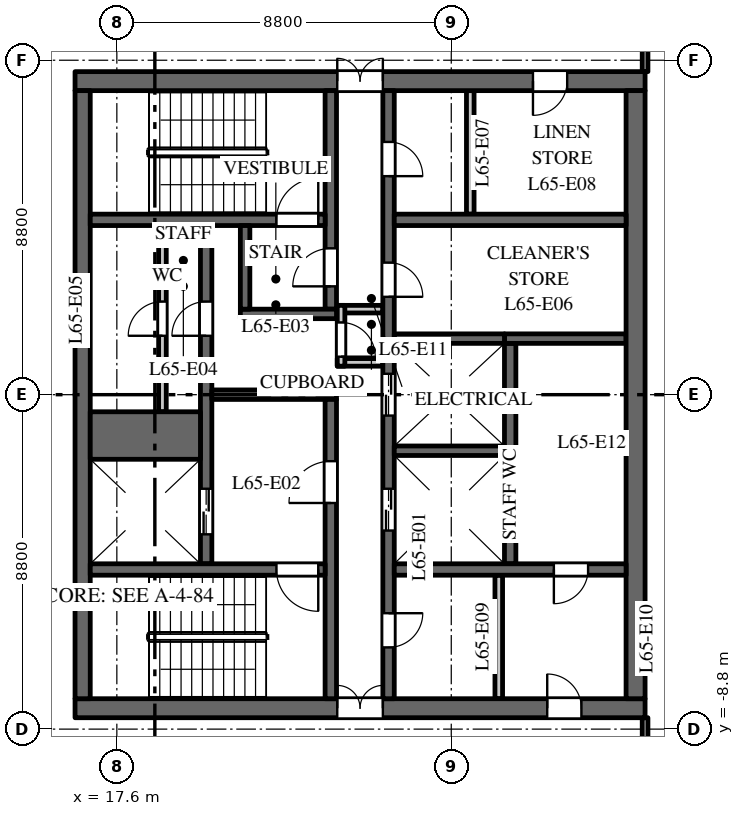
"""IFC4 building model, lengths in metres.
Left out: names, types, materials, properties, quantities, classifications, styles, units other than length and angle.
Written with IfcOpenShell. Run it as: python <this file> out.ifc"""

import sys

from ifc_helpers import new_model, si_unit, direction, frame, frame_2d, origin, place, context, subcontext, project, spatial, rectangle, extrude, element, fill, save


model = new_model("IFC4")
c1 = context("Model", 3, precision=1e-05, world=origin(), true_north=direction((0.0, 1.0)))
c2 = subcontext(c1, "Body", "Model", "MODEL_VIEW")
j1 = project(units=[si_unit("LENGTHUNIT", "METRE"), si_unit("PLANEANGLEUNIT", "RADIAN")], contexts=[c1])
p1 = place(None, origin())
s1 = spatial("IfcSite", under=j1, at=p1, CompositionType="ELEMENT")
p2 = place(p1, origin())
s2 = spatial("IfcBuilding", under=s1, at=p2, CompositionType="ELEMENT")
p3 = place(p2, frame((0.0, 0.0, 303.0)))
s3 = spatial("IfcBuildingStorey", under=s2, at=p3, CompositionType="ELEMENT", Elevation=303.0)
p4 = place(p3, frame((16.5, 8.25, 0.0), z_axis=(0.0, 0.0, 1.0), x_axis=(1.0, 0.0, 0.0)))
e1 = element("IfcWall", 1, at=p4, inside=s3, PredefinedType="SHEAR", context=c2, shape_type="SweptSolid", body=[
    extrude(rectangle(XDim=15.0, YDim=0.5, at=frame_2d((7.5, 0.0))), origin(), (0.0, 0.0, 1.0), 3.7),
])
p5 = place(p4, frame((6.9, 0.0, 0.0)))
e2 = element("IfcOpeningElement", 2, at=p5, cuts=e1, PredefinedType="OPENING", context=c2, shape_type="SweptSolid", body=[
    extrude(rectangle(XDim=1.2, YDim=2.1, at=frame_2d((0.6, 1.05))), frame((0.0, 0.26, 0.0), z_axis=(0.0, -1.0, 0.0), x_axis=(1.0, 0.0, 0.0)), (0.0, 0.0, 1.0), 0.52),
])
p6 = place(p4, frame((12.05, 0.0, 0.0)))
e3 = element("IfcOpeningElement", 3, at=p6, cuts=e1, PredefinedType="OPENING", context=c2, shape_type="SweptSolid", body=[
    extrude(rectangle(XDim=0.9, YDim=2.1, at=frame_2d((0.45, 1.05))), frame((0.0, 0.26, 0.0), z_axis=(0.0, -1.0, 0.0), x_axis=(1.0, 0.0, 0.0)), (0.0, 0.0, 1.0), 0.52),
])
p7 = place(p3, frame((16.5, -8.25, 0.0), z_axis=(0.0, 0.0, 1.0), x_axis=(1.0, 0.0, 0.0)))
e4 = element("IfcWall", 4, at=p7, inside=s3, PredefinedType="SHEAR", context=c2, shape_type="SweptSolid", body=[
    extrude(rectangle(XDim=15.0, YDim=0.5, at=frame_2d((7.5, 0.0))), origin(), (0.0, 0.0, 1.0), 3.7),
])
p8 = place(p7, frame((6.9, 0.0, 0.0)))
e5 = element("IfcOpeningElement", 5, at=p8, cuts=e4, PredefinedType="OPENING", context=c2, shape_type="SweptSolid", body=[
    extrude(rectangle(XDim=1.2, YDim=2.1, at=frame_2d((0.6, 1.05))), frame((0.0, 0.26, 0.0), z_axis=(0.0, -1.0, 0.0), x_axis=(1.0, 0.0, 0.0)), (0.0, 0.0, 1.0), 0.52),
])
p9 = place(p7, frame((12.425, 0.0, 0.0)))
e6 = element("IfcOpeningElement", 6, at=p9, cuts=e4, PredefinedType="OPENING", context=c2, shape_type="SweptSolid", body=[
    extrude(rectangle(XDim=0.9, YDim=2.1, at=frame_2d((0.45, 1.05))), frame((0.0, 0.26, 0.0), z_axis=(0.0, -1.0, 0.0), x_axis=(1.0, 0.0, 0.0)), (0.0, 0.0, 1.0), 0.52),
])
p10 = place(p3, frame((18.8, -0.45, 0.0), z_axis=(0.0, 0.0, 1.0), x_axis=(0.0, 1.0, 0.0)))
e7 = element("IfcWall", 7, at=p10, inside=s3, PredefinedType="PARTITIONING", context=c2, shape_type="SweptSolid", body=[
    extrude(rectangle(XDim=4.9, YDim=0.2, at=frame_2d((2.45, 0.0))), origin(), (0.0, 0.0, 1.0), 3.7),
])
p11 = place(p10, frame((2.0, 0.0, 0.0)))
e8 = element("IfcOpeningElement", 8, at=p11, cuts=e7, PredefinedType="OPENING", context=c2, shape_type="SweptSolid", body=[
    extrude(rectangle(XDim=0.9, YDim=2.1, at=frame_2d((0.45, 1.05))), frame((0.0, 0.11, 0.0), z_axis=(0.0, -1.0, 0.0), x_axis=(1.0, 0.0, 0.0)), (0.0, 0.0, 1.0), 0.22),
])
p12 = place(p3, frame((27.95, -4.45, 0.0), z_axis=(0.0, 0.0, 1.0), x_axis=(0.0, 1.0, 0.0)))
e9 = element("IfcWall", 9, at=p12, inside=s3, PredefinedType="SHEAR", context=c2, shape_type="SweptSolid", body=[
    extrude(rectangle(XDim=5.8, YDim=0.3, at=frame_2d((2.9, 0.0))), origin(), (0.0, 0.0, 1.0), 3.7),
])
p13 = place(p3, frame((27.8, 1.475, 0.0), z_axis=(0.0, 0.0, 1.0), x_axis=(1.0, 0.0, 0.0)))
e10 = element("IfcWall", 10, at=p13, inside=s3, PredefinedType="SHEAR", context=c2, shape_type="SweptSolid", body=[
    extrude(rectangle(XDim=3.2, YDim=0.25, at=frame_2d((1.6, 0.0))), origin(), (0.0, 0.0, 1.0), 3.7),
])
p14 = place(p3, frame((19.95, -4.45, 0.0), z_axis=(0.0, 0.0, 1.0), x_axis=(0.0, 1.0, 0.0)))
e11 = element("IfcWall", 11, at=p14, inside=s3, PredefinedType="SHEAR", context=c2, shape_type="SweptSolid", body=[
    extrude(rectangle(XDim=8.9, YDim=0.3, at=frame_2d((4.45, 0.0))), origin(), (0.0, 0.0, 1.0), 3.7),
])
p15 = place(p14, frame((0.775, 0.0, 0.0)))
e12 = element("IfcOpeningElement", 12, at=p15, cuts=e11, PredefinedType="OPENING", context=c2, shape_type="SweptSolid", body=[
    extrude(rectangle(XDim=1.2, YDim=2.1, at=frame_2d((0.6, 1.05))), frame((0.0, 0.16, 0.0), z_axis=(0.0, -1.0, 0.0), x_axis=(1.0, 0.0, 0.0)), (0.0, 0.0, 1.0), 0.32),
])
p16 = place(p14, frame((6.0, 0.0, 0.0)))
e13 = element("IfcOpeningElement", 13, at=p16, cuts=e11, PredefinedType="OPENING", context=c2, shape_type="SweptSolid", body=[
    extrude(rectangle(XDim=0.9, YDim=2.1, at=frame_2d((0.45, 1.05))), frame((0.0, 0.16, 0.0), z_axis=(0.0, -1.0, 0.0), x_axis=(1.0, 0.0, 0.0)), (0.0, 0.0, 1.0), 0.32),
])
p17 = place(p3, frame((24.75, -8.0, 0.0), z_axis=(0.0, 0.0, 1.0), x_axis=(0.0, 1.0, 0.0)))
e14 = element("IfcWall", 14, at=p17, inside=s3, PredefinedType="SHEAR", context=c2, shape_type="SweptSolid", body=[
    extrude(rectangle(XDim=16.0, YDim=0.3, at=frame_2d((8.0, 0.0))), origin(), (0.0, 0.0, 1.0), 3.7),
])
p18 = place(p17, frame((4.425, 0.0, 0.0)))
e15 = element("IfcOpeningElement", 15, at=p18, cuts=e14, PredefinedType="OPENING", context=c2, shape_type="SweptSolid", body=[
    extrude(rectangle(XDim=1.1, YDim=2.1, at=frame_2d((0.55, 1.05))), frame((0.0, 0.16, 0.0), z_axis=(0.0, -1.0, 0.0), x_axis=(1.0, 0.0, 0.0)), (0.0, 0.0, 1.0), 0.32),
])
p19 = place(p17, frame((7.45, 0.0, 0.0)))
e16 = element("IfcOpeningElement", 16, at=p19, cuts=e14, PredefinedType="OPENING", context=c2, shape_type="SweptSolid", body=[
    extrude(rectangle(XDim=1.1, YDim=2.1, at=frame_2d((0.55, 1.05))), frame((0.0, 0.16, 0.0), z_axis=(0.0, -1.0, 0.0), x_axis=(1.0, 0.0, 0.0)), (0.0, 0.0, 1.0), 0.32),
])
p20 = place(p17, frame((10.575, 0.0, 0.0)))
e17 = element("IfcOpeningElement", 17, at=p20, cuts=e14, PredefinedType="OPENING", context=c2, shape_type="SweptSolid", body=[
    extrude(rectangle(XDim=0.9, YDim=2.1, at=frame_2d((0.45, 1.05))), frame((0.0, 0.16, 0.0), z_axis=(0.0, -1.0, 0.0), x_axis=(1.0, 0.0, 0.0)), (0.0, 0.0, 1.0), 0.32),
])
p21 = place(p17, frame((13.75, 0.0, 0.0)))
e18 = element("IfcOpeningElement", 18, at=p21, cuts=e14, PredefinedType="OPENING", context=c2, shape_type="SweptSolid", body=[
    extrude(rectangle(XDim=0.9, YDim=2.1, at=frame_2d((0.45, 1.05))), frame((0.0, 0.16, 0.0), z_axis=(0.0, -1.0, 0.0), x_axis=(1.0, 0.0, 0.0)), (0.0, 0.0, 1.0), 0.32),
])
p22 = place(p17, frame((1.35, 0.0, 0.0)))
e19 = element("IfcOpeningElement", 19, at=p22, cuts=e14, PredefinedType="OPENING", context=c2, shape_type="SweptSolid", body=[
    extrude(rectangle(XDim=0.9, YDim=2.1, at=frame_2d((0.45, 1.05))), frame((0.0, 0.16, 0.0), z_axis=(0.0, -1.0, 0.0), x_axis=(1.0, 0.0, 0.0)), (0.0, 0.0, 1.0), 0.32),
])
p23 = place(p3, frame((20.1, 0.0, 0.0), z_axis=(0.0, 0.0, 1.0), x_axis=(1.0, 0.0, 0.0)))
e20 = element("IfcWall", 20, at=p23, inside=s3, PredefinedType="SHEAR", context=c2, shape_type="SweptSolid", body=[
    extrude(rectangle(XDim=3.28, YDim=0.25, at=frame_2d((1.64, 0.0))), origin(), (0.0, 0.0, 1.0), 3.7),
])
p24 = place(p3, frame((16.7, -8.0, 0.0), z_axis=(0.0, 0.0, 1.0), x_axis=(0.0, 1.0, 0.0)))
e21 = element("IfcWall", 21, at=p24, inside=s3, PredefinedType="SHEAR", context=c2, shape_type="SweptSolid", body=[
    extrude(rectangle(XDim=16.0, YDim=0.4, at=frame_2d((8.0, 0.0))), origin(), (0.0, 0.0, 1.0), 3.7),
])
for number, where, z_axis, x_axis in (
    (22, (23.4, 0.85, 0.0), (0.0, 0.0, 1.0), (1.0, 0.0, 0.0)),
    (23, (23.4, 2.25, 0.0), (0.0, 0.0, 1.0), (1.0, 0.0, 0.0)),
):
    element("IfcWall", number, at=place(p3, frame(where, z_axis=z_axis, x_axis=x_axis)), inside=s3, PredefinedType="PARTITIONING", context=c2, shape_type="SweptSolid", body=[
        extrude(rectangle(XDim=1.2, YDim=0.2, at=frame_2d((0.6, 0.0))), origin(), (0.0, 0.0, 1.0), 3.7),
    ])
p25 = place(p3, frame((23.5, 0.75, 0.0), z_axis=(0.0, 0.0, 1.0), x_axis=(0.0, 1.0, 0.0)))
e24 = element("IfcWall", 24, at=p25, inside=s3, PredefinedType="PARTITIONING", context=c2, shape_type="SweptSolid", body=[
    extrude(rectangle(XDim=1.6, YDim=0.2, at=frame_2d((0.8, 0.0))), origin(), (0.0, 0.0, 1.0), 3.7),
])
p26 = place(p25, frame((0.25, 0.0, 0.0)))
e25 = element("IfcOpeningElement", 25, at=p26, cuts=e24, PredefinedType="OPENING", context=c2, shape_type="SweptSolid", body=[
    extrude(rectangle(XDim=0.9, YDim=2.1, at=frame_2d((0.45, 1.05))), frame((0.0, 0.11, 0.0), z_axis=(0.0, -1.0, 0.0), x_axis=(1.0, 0.0, 0.0)), (0.0, 0.0, 1.0), 0.22),
])
p27 = place(p3, frame((31.25, -8.0, 0.0), z_axis=(0.0, 0.0, 1.0), x_axis=(0.0, 1.0, 0.0)))
e26 = element("IfcWall", 26, at=p27, inside=s3, PredefinedType="SHEAR", context=c2, shape_type="SweptSolid", body=[
    extrude(rectangle(XDim=16.0, YDim=0.5, at=frame_2d((8.0, 0.0))), origin(), (0.0, 0.0, 1.0), 3.7),
])
p28 = place(p3, frame((24.9, 4.6, 0.0), z_axis=(0.0, 0.0, 1.0), x_axis=(1.0, 0.0, 0.0)))
e27 = element("IfcWall", 27, at=p28, inside=s3, PredefinedType="SHEAR", context=c2, shape_type="SweptSolid", body=[
    extrude(rectangle(XDim=6.1, YDim=0.3, at=frame_2d((3.05, 0.0))), origin(), (0.0, 0.0, 1.0), 3.7),
])
for number, where, z_axis, x_axis in (
    (28, (26.9, 4.75, 0.0), (0.0, 0.0, 1.0), (0.0, 1.0, 0.0)),
    (29, (27.65, -8.0, 0.0), (0.0, 0.0, 1.0), (0.0, 1.0, 0.0)),
):
    element("IfcWall", number, at=place(p3, frame(where, z_axis=z_axis, x_axis=x_axis)), inside=s3, PredefinedType="PARTITIONING", context=c2, shape_type="SweptSolid", body=[
        extrude(rectangle(XDim=3.25, YDim=0.2, at=frame_2d((1.625, 0.0))), origin(), (0.0, 0.0, 1.0), 3.7),
    ])
p29 = place(p3, frame((24.9, -4.6, 0.0), z_axis=(0.0, 0.0, 1.0), x_axis=(1.0, 0.0, 0.0)))
e30 = element("IfcWall", 30, at=p29, inside=s3, PredefinedType="SHEAR", context=c2, shape_type="SweptSolid", body=[
    extrude(rectangle(XDim=6.1, YDim=0.3, at=frame_2d((3.05, 0.0))), origin(), (0.0, 0.0, 1.0), 3.7),
])
p30 = place(p29, frame((4.2, 0.0, 0.0)))
e31 = element("IfcOpeningElement", 31, at=p30, cuts=e30, PredefinedType="OPENING", context=c2, shape_type="SweptSolid", body=[
    extrude(rectangle(XDim=0.9, YDim=2.1, at=frame_2d((0.45, 1.05))), frame((0.0, 0.16, 0.0), z_axis=(0.0, -1.0, 0.0), x_axis=(1.0, 0.0, 0.0)), (0.0, 0.0, 1.0), 0.32),
])
p31 = place(p3, frame((16.9, -1.075, 0.0), z_axis=(0.0, 0.0, 1.0), x_axis=(1.0, 0.0, 0.0)))
e32 = element("IfcWall", 32, at=p31, inside=s3, PredefinedType="SHEAR", context=c2, shape_type="SweptSolid", body=[
    extrude(rectangle(XDim=2.9, YDim=1.25, at=frame_2d((1.45, 0.0))), origin(), (0.0, 0.0, 1.0), 3.7),
])
for number, where, z_axis, x_axis in (
    (33, (24.9, -1.475, 0.0), (0.0, 0.0, 1.0), (1.0, 0.0, 0.0)),
    (34, (24.9, 1.475, 0.0), (0.0, 0.0, 1.0), (1.0, 0.0, 0.0)),
):
    element("IfcWall", number, at=place(p3, frame(where, z_axis=z_axis, x_axis=x_axis)), inside=s3, PredefinedType="SHEAR", context=c2, shape_type="SweptSolid", body=[
        extrude(rectangle(XDim=2.9, YDim=0.25, at=frame_2d((1.45, 0.0))), origin(), (0.0, 0.0, 1.0), 3.7),
    ])
p32 = place(p3, frame((23.23, 2.25, 0.0), z_axis=(0.0, 0.0, 1.0), x_axis=(0.0, 1.0, 0.0)))
e35 = element("IfcWall", 35, at=p32, inside=s3, PredefinedType="SHEAR", context=c2, shape_type="SweptSolid", body=[
    extrude(rectangle(XDim=5.75, YDim=0.3, at=frame_2d((2.875, 0.0))), origin(), (0.0, 0.0, 1.0), 3.7),
])
p33 = place(p32, frame((0.6, 0.0, 0.0)))
e36 = element("IfcOpeningElement", 36, at=p33, cuts=e35, PredefinedType="OPENING", context=c2, shape_type="SweptSolid", body=[
    extrude(rectangle(XDim=1.0, YDim=2.1, at=frame_2d((0.5, 1.05))), frame((0.0, 0.16, 0.0), z_axis=(0.0, -1.0, 0.0), x_axis=(1.0, 0.0, 0.0)), (0.0, 0.0, 1.0), 0.32),
])
p34 = place(p3, frame((23.23, -8.0, 0.0), z_axis=(0.0, 0.0, 1.0), x_axis=(0.0, 1.0, 0.0)))
e37 = element("IfcWall", 37, at=p34, inside=s3, PredefinedType="SHEAR", context=c2, shape_type="SweptSolid", body=[
    extrude(rectangle(XDim=7.875, YDim=0.3, at=frame_2d((3.938, 0.0))), origin(), (0.0, 0.0, 1.0), 3.7),
])
p35 = place(p34, frame((5.15, 0.0, 0.0)))
e38 = element("IfcOpeningElement", 38, at=p35, cuts=e37, PredefinedType="OPENING", context=c2, shape_type="SweptSolid", body=[
    extrude(rectangle(XDim=1.1, YDim=2.1, at=frame_2d((0.55, 1.05))), frame((0.0, 0.16, 0.0), z_axis=(0.0, -1.0, 0.0), x_axis=(1.0, 0.0, 0.0)), (0.0, 0.0, 1.0), 0.32),
])
p36 = place(p3, frame((16.9, 4.6, 0.0), z_axis=(0.0, 0.0, 1.0), x_axis=(1.0, 0.0, 0.0)))
e39 = element("IfcWall", 39, at=p36, inside=s3, PredefinedType="SHEAR", context=c2, shape_type="SweptSolid", body=[
    extrude(rectangle(XDim=6.18, YDim=0.3, at=frame_2d((3.09, 0.0))), origin(), (0.0, 0.0, 1.0), 3.7),
])
p37 = place(p36, frame((4.9, 0.0, 0.0)))
e40 = element("IfcOpeningElement", 40, at=p37, cuts=e39, PredefinedType="OPENING", context=c2, shape_type="SweptSolid", body=[
    extrude(rectangle(XDim=1.1, YDim=2.1, at=frame_2d((0.55, 1.05))), frame((0.0, 0.16, 0.0), z_axis=(0.0, -1.0, 0.0), x_axis=(1.0, 0.0, 0.0)), (0.0, 0.0, 1.0), 0.32),
])
p38 = place(p3, frame((16.9, -4.6, 0.0), z_axis=(0.0, 0.0, 1.0), x_axis=(1.0, 0.0, 0.0)))
e41 = element("IfcWall", 41, at=p38, inside=s3, PredefinedType="SHEAR", context=c2, shape_type="SweptSolid", body=[
    extrude(rectangle(XDim=6.18, YDim=0.3, at=frame_2d((3.09, 0.0))), origin(), (0.0, 0.0, 1.0), 3.7),
])
p39 = place(p38, frame((4.9, 0.0, 0.0)))
e42 = element("IfcOpeningElement", 42, at=p39, cuts=e41, PredefinedType="OPENING", context=c2, shape_type="SweptSolid", body=[
    extrude(rectangle(XDim=1.1, YDim=2.1, at=frame_2d((0.55, 1.05))), frame((0.0, 0.16, 0.0), z_axis=(0.0, -1.0, 0.0), x_axis=(1.0, 0.0, 0.0)), (0.0, 0.0, 1.0), 0.32),
])
p40 = place(p3, frame((20.85, 2.125, 0.0), z_axis=(0.0, 0.0, 1.0), x_axis=(1.0, 0.0, 0.0)))
e43 = element("IfcWall", 43, at=p40, inside=s3, PredefinedType="SHEAR", context=c2, shape_type="SweptSolid", body=[
    extrude(rectangle(XDim=2.53, YDim=0.25, at=frame_2d((1.265, 0.0))), origin(), (0.0, 0.0, 1.0), 3.7),
])
p41 = place(p3, frame((20.975, 2.25, 0.0), z_axis=(0.0, 0.0, 1.0), x_axis=(0.0, 1.0, 0.0)))
e44 = element("IfcWall", 44, at=p41, inside=s3, PredefinedType="SHEAR", context=c2, shape_type="SweptSolid", body=[
    extrude(rectangle(XDim=2.2, YDim=0.25, at=frame_2d((1.1, 0.0))), origin(), (0.0, 0.0, 1.0), 3.7),
])
p42 = place(p3, frame((31.5, -11.5, 0.0), z_axis=(0.0, 0.0, 1.0), x_axis=(0.0, 1.0, 0.0)))
e45 = element("IfcWall", 45, at=p42, inside=s3, PredefinedType="PARTITIONING", context=c2, shape_type="SweptSolid", body=[
    extrude(rectangle(XDim=3.0, YDim=0.15, at=frame_2d((1.5, 0.0))), origin(), (0.0, 0.0, 1.0), 3.0),
])
p43 = place(p42, frame((1.4, 0.0, 0.0)))
e46 = element("IfcOpeningElement", 46, at=p43, cuts=e45, PredefinedType="OPENING", context=c2, shape_type="SweptSolid", body=[
    extrude(rectangle(XDim=1.0, YDim=2.1, at=frame_2d((0.5, 1.05))), frame((0.0, 0.085, 0.0), z_axis=(0.0, -1.0, 0.0), x_axis=(1.0, 0.0, 0.0)), (0.0, 0.0, 1.0), 0.17),
])
p44 = place(p3, frame((31.5, 8.5, 0.0), z_axis=(0.0, 0.0, 1.0), x_axis=(0.0, 1.0, 0.0)))
e47 = element("IfcWall", 47, at=p44, inside=s3, PredefinedType="PARTITIONING", context=c2, shape_type="SweptSolid", body=[
    extrude(rectangle(XDim=3.0, YDim=0.15, at=frame_2d((1.5, 0.0))), origin(), (0.0, 0.0, 1.0), 3.0),
])
p45 = place(p15, origin())
e48 = element("IfcDoor", 48, at=p45, inside=s3, OperationType="DOUBLE_DOOR_SLIDING", PredefinedType="DOOR", context=c2, shape_type="SweptSolid", body=[
    extrude(rectangle(XDim=1.2, YDim=2.1, at=frame_2d((0.6, 1.05))), frame((0.0, 0.025, 0.0), z_axis=(0.0, -1.0, 0.0), x_axis=(1.0, 0.0, 0.0)), (0.0, 0.0, 1.0), 0.05),
])
fill(e12, e48)
p46 = place(p18, origin())
e49 = element("IfcDoor", 49, at=p46, inside=s3, OperationType="DOUBLE_DOOR_SLIDING", PredefinedType="DOOR", context=c2, shape_type="SweptSolid", body=[
    extrude(rectangle(XDim=1.1, YDim=2.1, at=frame_2d((0.55, 1.05))), frame((0.0, 0.025, 0.0), z_axis=(0.0, -1.0, 0.0), x_axis=(1.0, 0.0, 0.0)), (0.0, 0.0, 1.0), 0.05),
])
fill(e15, e49)
p47 = place(p19, origin())
e50 = element("IfcDoor", 50, at=p47, inside=s3, OperationType="DOUBLE_DOOR_SLIDING", PredefinedType="DOOR", context=c2, shape_type="SweptSolid", body=[
    extrude(rectangle(XDim=1.1, YDim=2.1, at=frame_2d((0.55, 1.05))), frame((0.0, 0.025, 0.0), z_axis=(0.0, -1.0, 0.0), x_axis=(1.0, 0.0, 0.0)), (0.0, 0.0, 1.0), 0.05),
])
fill(e16, e50)
p48 = place(p37, origin())
e51 = element("IfcDoor", 51, at=p48, inside=s3, OperationType="SINGLE_SWING_LEFT", PredefinedType="DOOR", context=c2, shape_type="SweptSolid", body=[
    extrude(rectangle(XDim=1.1, YDim=2.1, at=frame_2d((0.55, 1.05))), frame((0.0, 0.025, 0.0), z_axis=(0.0, -1.0, 0.0), x_axis=(1.0, 0.0, 0.0)), (0.0, 0.0, 1.0), 0.05),
])
fill(e40, e51)
p49 = place(p39, origin())
e52 = element("IfcDoor", 52, at=p49, inside=s3, OperationType="SINGLE_SWING_RIGHT", PredefinedType="DOOR", context=c2, shape_type="SweptSolid", body=[
    extrude(rectangle(XDim=1.1, YDim=2.1, at=frame_2d((0.55, 1.05))), frame((0.0, 0.025, 0.0), z_axis=(0.0, -1.0, 0.0), x_axis=(1.0, 0.0, 0.0)), (0.0, 0.0, 1.0), 0.05),
])
fill(e42, e52)
p50 = place(p35, origin())
e53 = element("IfcDoor", 53, at=p50, inside=s3, OperationType="SINGLE_SWING_RIGHT", PredefinedType="DOOR", context=c2, shape_type="SweptSolid", body=[
    extrude(rectangle(XDim=1.1, YDim=2.1, at=frame_2d((0.55, 1.05))), frame((0.0, 0.025, 0.0), z_axis=(0.0, -1.0, 0.0), x_axis=(1.0, 0.0, 0.0)), (0.0, 0.0, 1.0), 0.05),
])
fill(e38, e53)
p51 = place(p33, origin())
e54 = element("IfcDoor", 54, at=p51, inside=s3, OperationType="SINGLE_SWING_RIGHT", PredefinedType="DOOR", context=c2, shape_type="SweptSolid", body=[
    extrude(rectangle(XDim=1.0, YDim=2.1, at=frame_2d((0.5, 1.05))), frame((0.0, 0.025, 0.0), z_axis=(0.0, -1.0, 0.0), x_axis=(1.0, 0.0, 0.0)), (0.0, 0.0, 1.0), 0.05),
])
fill(e36, e54)
p52 = place(p5, origin())
e55 = element("IfcDoor", 55, at=p52, inside=s3, OperationType="DOUBLE_DOOR_DOUBLE_SWING", PredefinedType="DOOR", context=c2, shape_type="SweptSolid", body=[
    extrude(rectangle(XDim=1.2, YDim=2.1, at=frame_2d((0.6, 1.05))), frame((0.0, 0.025, 0.0), z_axis=(0.0, -1.0, 0.0), x_axis=(1.0, 0.0, 0.0)), (0.0, 0.0, 1.0), 0.05),
])
fill(e2, e55)
p53 = place(p8, origin())
e56 = element("IfcDoor", 56, at=p53, inside=s3, OperationType="DOUBLE_DOOR_DOUBLE_SWING", PredefinedType="DOOR", context=c2, shape_type="SweptSolid", body=[
    extrude(rectangle(XDim=1.2, YDim=2.1, at=frame_2d((0.6, 1.05))), frame((0.0, 0.025, 0.0), z_axis=(0.0, -1.0, 0.0), x_axis=(1.0, 0.0, 0.0)), (0.0, 0.0, 1.0), 0.05),
])
fill(e5, e56)
p54 = place(p16, origin())
e57 = element("IfcDoor", 57, at=p54, inside=s3, OperationType="SINGLE_SWING_RIGHT", PredefinedType="DOOR", context=c2, shape_type="SweptSolid", body=[
    extrude(rectangle(XDim=0.9, YDim=2.1, at=frame_2d((0.45, 1.05))), frame((0.0, 0.025, 0.0), z_axis=(0.0, -1.0, 0.0), x_axis=(1.0, 0.0, 0.0)), (0.0, 0.0, 1.0), 0.05),
])
fill(e13, e57)
p55 = place(p11, origin())
e58 = element("IfcDoor", 58, at=p55, inside=s3, OperationType="SINGLE_SWING_RIGHT", PredefinedType="DOOR", context=c2, shape_type="SweptSolid", body=[
    extrude(rectangle(XDim=0.9, YDim=2.1, at=frame_2d((0.45, 1.05))), frame((0.0, 0.025, 0.0), z_axis=(0.0, -1.0, 0.0), x_axis=(1.0, 0.0, 0.0)), (0.0, 0.0, 1.0), 0.05),
])
fill(e8, e58)
p56 = place(p20, origin())
e59 = element("IfcDoor", 59, at=p56, inside=s3, OperationType="SINGLE_SWING_LEFT", PredefinedType="DOOR", context=c2, shape_type="SweptSolid", body=[
    extrude(rectangle(XDim=0.9, YDim=2.1, at=frame_2d((0.45, 1.05))), frame((0.0, 0.025, 0.0), z_axis=(0.0, -1.0, 0.0), x_axis=(1.0, 0.0, 0.0)), (0.0, 0.0, 1.0), 0.05),
])
fill(e17, e59)
p57 = place(p21, origin())
e60 = element("IfcDoor", 60, at=p57, inside=s3, OperationType="SINGLE_SWING_LEFT", PredefinedType="DOOR", context=c2, shape_type="SweptSolid", body=[
    extrude(rectangle(XDim=0.9, YDim=2.1, at=frame_2d((0.45, 1.05))), frame((0.0, 0.025, 0.0), z_axis=(0.0, -1.0, 0.0), x_axis=(1.0, 0.0, 0.0)), (0.0, 0.0, 1.0), 0.05),
])
fill(e18, e60)
p58 = place(p6, origin())
e61 = element("IfcDoor", 61, at=p58, inside=s3, OperationType="SINGLE_SWING_LEFT", PredefinedType="DOOR", context=c2, shape_type="SweptSolid", body=[
    extrude(rectangle(XDim=0.9, YDim=2.1, at=frame_2d((0.45, 1.05))), frame((0.0, 0.025, 0.0), z_axis=(0.0, -1.0, 0.0), x_axis=(1.0, 0.0, 0.0)), (0.0, 0.0, 1.0), 0.05),
])
fill(e3, e61)
p59 = place(p22, origin())
e62 = element("IfcDoor", 62, at=p59, inside=s3, OperationType="SINGLE_SWING_RIGHT", PredefinedType="DOOR", context=c2, shape_type="SweptSolid", body=[
    extrude(rectangle(XDim=0.9, YDim=2.1, at=frame_2d((0.45, 1.05))), frame((0.0, 0.025, 0.0), z_axis=(0.0, -1.0, 0.0), x_axis=(1.0, 0.0, 0.0)), (0.0, 0.0, 1.0), 0.05),
])
fill(e19, e62)
p60 = place(p9, origin())
e63 = element("IfcDoor", 63, at=p60, inside=s3, OperationType="SINGLE_SWING_RIGHT", PredefinedType="DOOR", context=c2, shape_type="SweptSolid", body=[
    extrude(rectangle(XDim=0.9, YDim=2.1, at=frame_2d((0.45, 1.05))), frame((0.0, 0.025, 0.0), z_axis=(0.0, -1.0, 0.0), x_axis=(1.0, 0.0, 0.0)), (0.0, 0.0, 1.0), 0.05),
])
fill(e6, e63)
p61 = place(p26, origin())
e64 = element("IfcDoor", 64, at=p61, inside=s3, OperationType="SINGLE_SWING_LEFT", PredefinedType="DOOR", context=c2, shape_type="SweptSolid", body=[
    extrude(rectangle(XDim=0.9, YDim=2.1, at=frame_2d((0.45, 1.05))), frame((0.0, 0.025, 0.0), z_axis=(0.0, -1.0, 0.0), x_axis=(1.0, 0.0, 0.0)), (0.0, 0.0, 1.0), 0.05),
])
fill(e25, e64)
p62 = place(p30, origin())
e65 = element("IfcDoor", 65, at=p62, inside=s3, OperationType="SINGLE_SWING_LEFT", PredefinedType="DOOR", context=c2, shape_type="SweptSolid", body=[
    extrude(rectangle(XDim=0.9, YDim=2.1, at=frame_2d((0.45, 1.05))), frame((0.0, 0.025, 0.0), z_axis=(0.0, -1.0, 0.0), x_axis=(1.0, 0.0, 0.0)), (0.0, 0.0, 1.0), 0.05),
])
fill(e31, e65)
save(model, sys.argv[1])
